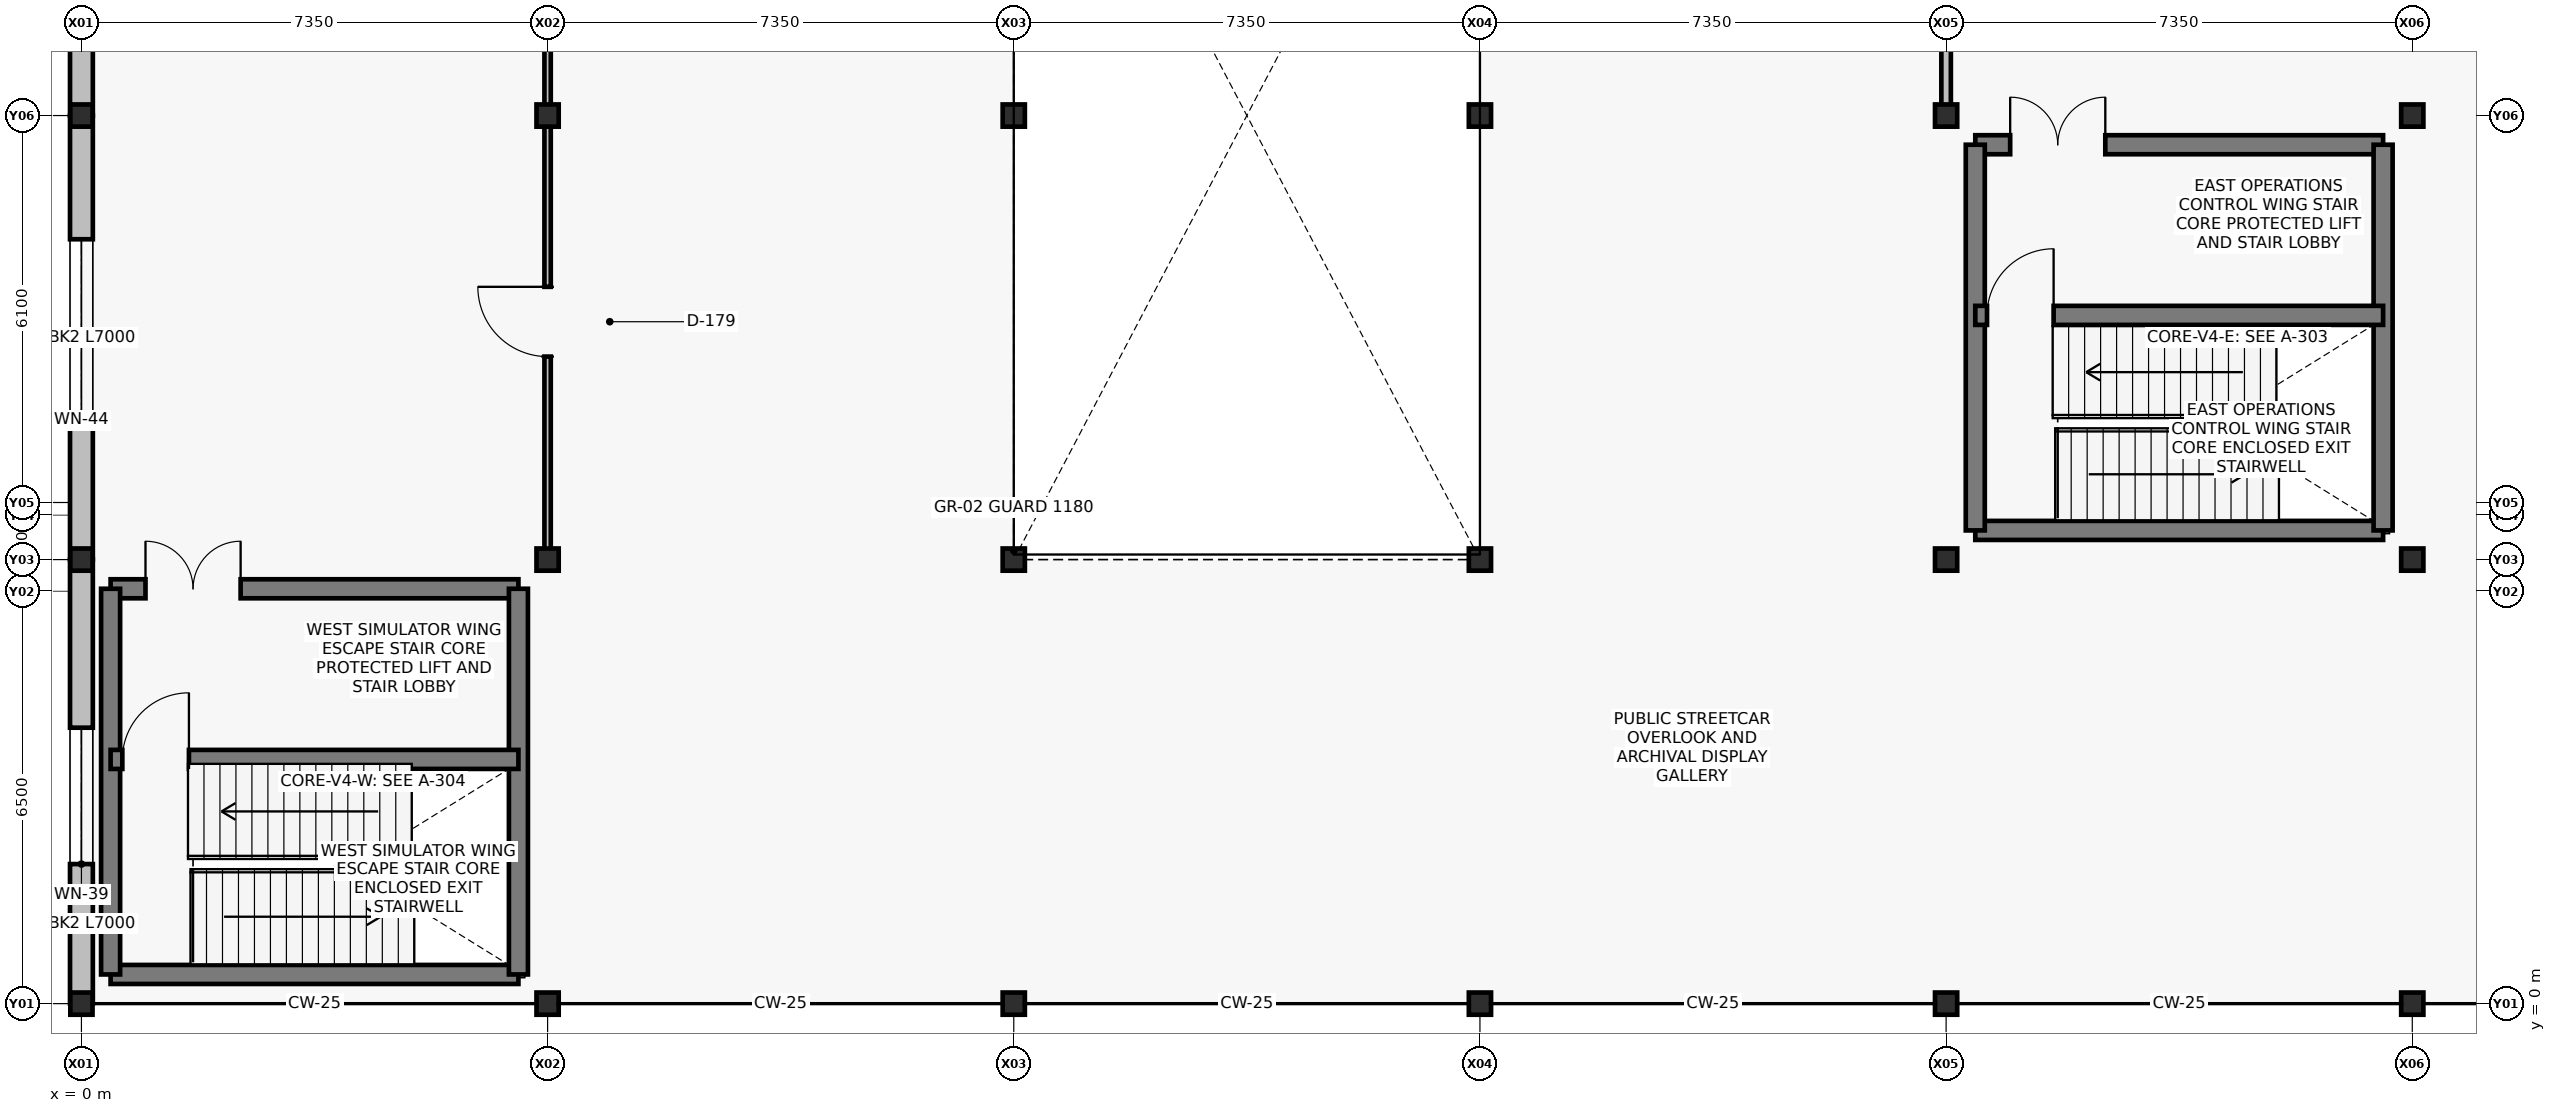
"""IFC4 building model, lengths in metres.
Left out: names, types, materials, properties, quantities, classifications, styles, units other than length and angle.
Written with IfcOpenShell. Run it as: python <this file> out.ifc"""

import sys

from ifc_helpers import new_model, si_unit, direction, frame, frame_2d, origin, origin_2d, place, context, subcontext, project, spatial, rectangle, i_section, extrude, element, fill, save


model = new_model("IFC4")
c1 = context("Model", 3, precision=1e-05, world=origin(), true_north=direction((0.0, 1.0)))
c2 = subcontext(c1, "Body", "Model", "MODEL_VIEW")
j1 = project(units=[si_unit("LENGTHUNIT", "METRE"), si_unit("PLANEANGLEUNIT", "RADIAN")], contexts=[c1])
p1 = place(None, origin())
s1 = spatial("IfcSite", under=j1, at=p1, CompositionType="ELEMENT")
p2 = place(p1, origin())
s2 = spatial("IfcBuilding", under=s1, at=p2, CompositionType="ELEMENT")
p3 = place(p2, frame((0.0, 0.0, 6.0)))
s3 = spatial("IfcBuildingStorey", under=s2, at=p3, CompositionType="ELEMENT", Elevation=6.0)
for number, where, z_axis, x_axis in (
    (1, (0.0, 0.0, 0.0), (0.0, 0.0, 1.0), (1.0, 0.0, 0.0)),
    (2, (0.0, 7.0, 0.0), (0.0, 0.0, 1.0), (1.0, 0.0, 0.0)),
    (3, (0.0, 14.0, 0.0), (0.0, 0.0, 1.0), (1.0, 0.0, 0.0)),
    (4, (7.35, 0.0, 0.0), (0.0, 0.0, 1.0), (1.0, 0.0, 0.0)),
    (5, (7.35, 7.0, 0.0), (0.0, 0.0, 1.0), (1.0, 0.0, 0.0)),
    (6, (7.35, 14.0, 0.0), (0.0, 0.0, 1.0), (1.0, 0.0, 0.0)),
    (7, (14.7, 0.0, 0.0), (0.0, 0.0, 1.0), (1.0, 0.0, 0.0)),
    (8, (14.7, 7.0, 0.0), (0.0, 0.0, 1.0), (1.0, 0.0, 0.0)),
    (9, (14.7, 14.0, 0.0), (0.0, 0.0, 1.0), (1.0, 0.0, 0.0)),
    (10, (22.05, 0.0, 0.0), (0.0, 0.0, 1.0), (1.0, 0.0, 0.0)),
    (11, (22.05, 7.0, 0.0), (0.0, 0.0, 1.0), (1.0, 0.0, 0.0)),
    (12, (22.05, 14.0, 0.0), (0.0, 0.0, 1.0), (1.0, 0.0, 0.0)),
    (13, (29.4, 0.0, 0.0), (0.0, 0.0, 1.0), (1.0, 0.0, 0.0)),
    (14, (29.4, 7.0, 0.0), (0.0, 0.0, 1.0), (1.0, 0.0, 0.0)),
    (15, (29.4, 14.0, 0.0), (0.0, 0.0, 1.0), (1.0, 0.0, 0.0)),
    (16, (36.75, 0.0, 0.0), (0.0, 0.0, 1.0), (1.0, 0.0, 0.0)),
    (17, (36.75, 7.0, 0.0), (0.0, 0.0, 1.0), (1.0, 0.0, 0.0)),
    (18, (36.75, 14.0, 0.0), (0.0, 0.0, 1.0), (1.0, 0.0, 0.0)),
):
    element("IfcColumn", number, at=place(p3, frame(where, z_axis=z_axis, x_axis=x_axis)), inside=s3, PredefinedType="COLUMN", context=c2, shape_type="SweptSolid", body=[
        extrude(i_section(OverallWidth=0.35, OverallDepth=0.35, WebThickness=0.012, FlangeThickness=0.019, at=origin_2d()), origin(), (0.0, 0.0, 1.0), 5.1),
    ])
p4 = place(p3, frame((0.0, 0.0, 0.0), z_axis=(0.0, 0.0, 1.0), x_axis=(0.0, 1.0, 0.0)))
e19 = element("IfcWall", 19, at=p4, inside=s3, PredefinedType="SOLIDWALL", context=c2, shape_type="SweptSolid", body=[
    extrude(rectangle(XDim=7.0, YDim=0.36, at=frame_2d((3.5, 0.0))), origin(), (0.0, 0.0, 1.0), 4.25),
])
p5 = place(p4, frame((2.2, 0.0, 0.95)))
e20 = element("IfcOpeningElement", 20, at=p5, cuts=e19, PredefinedType="OPENING", context=c2, shape_type="SweptSolid", body=[
    extrude(rectangle(XDim=2.15, YDim=1.9, at=frame_2d((1.075, 0.95))), frame((0.0, 0.19, 0.0), z_axis=(0.0, -1.0, 0.0), x_axis=(1.0, 0.0, 0.0)), (0.0, 0.0, 1.0), 0.38),
])
p6 = place(p3, frame((0.0, 7.0, 0.0), z_axis=(0.0, 0.0, 1.0), x_axis=(0.0, 1.0, 0.0)))
e21 = element("IfcWall", 21, at=p6, inside=s3, PredefinedType="SOLIDWALL", context=c2, shape_type="SweptSolid", body=[
    extrude(rectangle(XDim=7.0, YDim=0.36, at=frame_2d((3.5, 0.0))), origin(), (0.0, 0.0, 1.0), 4.25),
])
p7 = place(p6, frame((2.2, 0.0, 0.95)))
e22 = element("IfcOpeningElement", 22, at=p7, cuts=e21, PredefinedType="OPENING", context=c2, shape_type="SweptSolid", body=[
    extrude(rectangle(XDim=2.85, YDim=1.85, at=frame_2d((1.425, 0.925))), frame((0.0, 0.19, 0.0), z_axis=(0.0, -1.0, 0.0), x_axis=(1.0, 0.0, 0.0)), (0.0, 0.0, 1.0), 0.38),
])
p8 = place(p3, frame((0.0, 14.0, 0.0), z_axis=(0.0, 0.0, 1.0), x_axis=(0.0, 1.0, 0.0)))
e23 = element("IfcWall", 23, at=p8, inside=s3, PredefinedType="SOLIDWALL", context=c2, shape_type="SweptSolid", body=[
    extrude(rectangle(XDim=7.0, YDim=0.36, at=frame_2d((3.5, 0.0))), origin(), (0.0, 0.0, 1.0), 4.25),
])
p9 = place(p8, frame((2.2, 0.0, 0.95)))
e24 = element("IfcOpeningElement", 24, at=p9, cuts=e23, PredefinedType="OPENING", context=c2, shape_type="SweptSolid", body=[
    extrude(rectangle(XDim=3.5, YDim=2.0, at=frame_2d((1.75, 1.0))), frame((0.0, 0.19, 0.0), z_axis=(0.0, -1.0, 0.0), x_axis=(1.0, 0.0, 0.0)), (0.0, 0.0, 1.0), 0.38),
])
p10 = place(p3, frame((29.86, 7.46, 0.0), z_axis=(0.0, 0.0, 1.0), x_axis=(1.0, 0.0, 0.0)))
e25 = element("IfcWall", 25, at=p10, inside=s3, PredefinedType="SHEAR", context=c2, shape_type="SweptSolid", body=[
    extrude(rectangle(XDim=6.43, YDim=0.3, at=frame_2d((3.215, 0.0))), origin(), (0.0, 0.0, 1.0), 4.82),
])
p11 = place(p3, frame((29.86, 13.54, 0.0), z_axis=(0.0, 0.0, 1.0), x_axis=(1.0, 0.0, 0.0)))
e26 = element("IfcWall", 26, at=p11, inside=s3, PredefinedType="SHEAR", context=c2, shape_type="SweptSolid", body=[
    extrude(rectangle(XDim=6.43, YDim=0.3, at=frame_2d((3.215, 0.0))), origin(), (0.0, 0.0, 1.0), 4.82),
])
p12 = place(p11, frame((0.55, 0.0, 0.0)))
e27 = element("IfcOpeningElement", 27, at=p12, cuts=e26, PredefinedType="OPENING", context=c2, shape_type="SweptSolid", body=[
    extrude(rectangle(XDim=1.5, YDim=2.2, at=frame_2d((0.75, 1.1))), frame((0.0, 0.16, 0.0), z_axis=(0.0, -1.0, 0.0), x_axis=(1.0, 0.0, 0.0)), (0.0, 0.0, 1.0), 0.32),
])
for number, where, z_axis, x_axis in (
    (28, (29.86, 7.46, 0.0), (0.0, 0.0, 1.0), (0.0, 1.0, 0.0)),
    (29, (36.29, 7.46, 0.0), (0.0, 0.0, 1.0), (0.0, 1.0, 0.0)),
):
    element("IfcWall", number, at=place(p3, frame(where, z_axis=z_axis, x_axis=x_axis)), inside=s3, PredefinedType="SHEAR", context=c2, shape_type="SweptSolid", body=[
        extrude(rectangle(XDim=6.08, YDim=0.3, at=frame_2d((3.04, 0.0))), origin(), (0.0, 0.0, 1.0), 4.82),
    ])
p13 = place(p3, frame((29.86, 10.85, 0.0), z_axis=(0.0, 0.0, 1.0), x_axis=(1.0, 0.0, 0.0)))
e30 = element("IfcWall", 30, at=p13, inside=s3, PredefinedType="SHEAR", context=c2, shape_type="SweptSolid", body=[
    extrude(rectangle(XDim=6.43, YDim=0.3, at=frame_2d((3.215, 0.0))), origin(), (0.0, 0.0, 1.0), 4.82),
])
p14 = place(p13, frame((0.185, 0.0, 0.0)))
e31 = element("IfcOpeningElement", 31, at=p14, cuts=e30, PredefinedType="OPENING", context=c2, shape_type="SweptSolid", body=[
    extrude(rectangle(XDim=1.05, YDim=2.15, at=frame_2d((0.525, 1.075))), frame((0.0, 0.16, 0.0), z_axis=(0.0, -1.0, 0.0), x_axis=(1.0, 0.0, 0.0)), (0.0, 0.0, 1.0), 0.32),
])
p15 = place(p3, frame((0.46, 0.46, 0.0), z_axis=(0.0, 0.0, 1.0), x_axis=(1.0, 0.0, 0.0)))
e32 = element("IfcWall", 32, at=p15, inside=s3, PredefinedType="SHEAR", context=c2, shape_type="SweptSolid", body=[
    extrude(rectangle(XDim=6.43, YDim=0.3, at=frame_2d((3.215, 0.0))), origin(), (0.0, 0.0, 1.0), 4.82),
])
p16 = place(p3, frame((0.46, 6.54, 0.0), z_axis=(0.0, 0.0, 1.0), x_axis=(1.0, 0.0, 0.0)))
e33 = element("IfcWall", 33, at=p16, inside=s3, PredefinedType="SHEAR", context=c2, shape_type="SweptSolid", body=[
    extrude(rectangle(XDim=6.43, YDim=0.3, at=frame_2d((3.215, 0.0))), origin(), (0.0, 0.0, 1.0), 4.82),
])
p17 = place(p16, frame((0.55, 0.0, 0.0)))
e34 = element("IfcOpeningElement", 34, at=p17, cuts=e33, PredefinedType="OPENING", context=c2, shape_type="SweptSolid", body=[
    extrude(rectangle(XDim=1.5, YDim=2.2, at=frame_2d((0.75, 1.1))), frame((0.0, 0.16, 0.0), z_axis=(0.0, -1.0, 0.0), x_axis=(1.0, 0.0, 0.0)), (0.0, 0.0, 1.0), 0.32),
])
for number, where, z_axis, x_axis in (
    (35, (0.46, 0.46, 0.0), (0.0, 0.0, 1.0), (0.0, 1.0, 0.0)),
    (36, (6.89, 0.46, 0.0), (0.0, 0.0, 1.0), (0.0, 1.0, 0.0)),
):
    element("IfcWall", number, at=place(p3, frame(where, z_axis=z_axis, x_axis=x_axis)), inside=s3, PredefinedType="SHEAR", context=c2, shape_type="SweptSolid", body=[
        extrude(rectangle(XDim=6.08, YDim=0.3, at=frame_2d((3.04, 0.0))), origin(), (0.0, 0.0, 1.0), 4.82),
    ])
p18 = place(p3, frame((0.46, 3.85, 0.0), z_axis=(0.0, 0.0, 1.0), x_axis=(1.0, 0.0, 0.0)))
e37 = element("IfcWall", 37, at=p18, inside=s3, PredefinedType="SHEAR", context=c2, shape_type="SweptSolid", body=[
    extrude(rectangle(XDim=6.43, YDim=0.3, at=frame_2d((3.215, 0.0))), origin(), (0.0, 0.0, 1.0), 4.82),
])
p19 = place(p18, frame((0.185, 0.0, 0.0)))
e38 = element("IfcOpeningElement", 38, at=p19, cuts=e37, PredefinedType="OPENING", context=c2, shape_type="SweptSolid", body=[
    extrude(rectangle(XDim=1.05, YDim=2.15, at=frame_2d((0.525, 1.075))), frame((0.0, 0.16, 0.0), z_axis=(0.0, -1.0, 0.0), x_axis=(1.0, 0.0, 0.0)), (0.0, 0.0, 1.0), 0.32),
])
p20 = place(p3, frame((29.4, 14.0, 0.0), z_axis=(0.0, 0.0, 1.0), x_axis=(0.0, 1.0, 0.0)))
e39 = element("IfcWall", 39, at=p20, inside=s3, PredefinedType="PARTITIONING", context=c2, shape_type="SweptSolid", body=[
    extrude(rectangle(XDim=49.0, YDim=0.15, at=frame_2d((24.5, 0.0))), origin(), (0.0, 0.0, 1.0), 4.05),
])
p21 = place(p20, frame((10.0, 0.0, 0.0)))
e40 = element("IfcOpeningElement", 40, at=p21, cuts=e39, PredefinedType="OPENING", context=c2, shape_type="SweptSolid", body=[
    extrude(rectangle(XDim=1.4, YDim=2.2, at=frame_2d((0.7, 1.1))), frame((0.0, 0.085, 0.0), z_axis=(0.0, -1.0, 0.0), x_axis=(1.0, 0.0, 0.0)), (0.0, 0.0, 1.0), 0.17),
])
p22 = place(p20, frame((31.0, 0.0, 0.0)))
e41 = element("IfcOpeningElement", 41, at=p22, cuts=e39, PredefinedType="OPENING", context=c2, shape_type="SweptSolid", body=[
    extrude(rectangle(XDim=1.25, YDim=2.15, at=frame_2d((0.625, 1.075))), frame((0.0, 0.085, 0.0), z_axis=(0.0, -1.0, 0.0), x_axis=(1.0, 0.0, 0.0)), (0.0, 0.0, 1.0), 0.17),
])
p23 = place(p3, frame((7.35, 7.0, 0.0), z_axis=(0.0, 0.0, 1.0), x_axis=(0.0, 1.0, 0.0)))
e42 = element("IfcWall", 42, at=p23, inside=s3, PredefinedType="PARTITIONING", context=c2, shape_type="SweptSolid", body=[
    extrude(rectangle(XDim=21.0, YDim=0.1, at=frame_2d((10.5, 0.0))), origin(), (0.0, 0.0, 1.0), 4.05),
])
p24 = place(p23, frame((3.2, 0.0, 0.0)))
e43 = element("IfcOpeningElement", 43, at=p24, cuts=e42, PredefinedType="OPENING", context=c2, shape_type="SweptSolid", body=[
    extrude(rectangle(XDim=1.1, YDim=2.1, at=frame_2d((0.55, 1.05))), frame((0.0, 0.06, 0.0), z_axis=(0.0, -1.0, 0.0), x_axis=(1.0, 0.0, 0.0)), (0.0, 0.0, 1.0), 0.12),
])
p25 = place(p5, origin())
e44 = element("IfcWindow", 44, at=p25, inside=s3, PartitioningType="SINGLE_PANEL", PredefinedType="WINDOW", context=c2, shape_type="SweptSolid", body=[
    extrude(rectangle(XDim=2.15, YDim=1.9, at=frame_2d((1.075, 0.95))), frame((0.0, 0.03, 0.0), z_axis=(0.0, -1.0, 0.0), x_axis=(1.0, 0.0, 0.0)), (0.0, 0.0, 1.0), 0.06),
])
fill(e20, e44)
p26 = place(p7, origin())
e45 = element("IfcWindow", 45, at=p26, inside=s3, PartitioningType="SINGLE_PANEL", PredefinedType="WINDOW", context=c2, shape_type="SweptSolid", body=[
    extrude(rectangle(XDim=2.85, YDim=1.85, at=frame_2d((1.425, 0.925))), frame((0.0, 0.03, 0.0), z_axis=(0.0, -1.0, 0.0), x_axis=(1.0, 0.0, 0.0)), (0.0, 0.0, 1.0), 0.06),
])
fill(e22, e45)
p27 = place(p14, origin())
e46 = element("IfcDoor", 46, at=p27, inside=s3, OperationType="SINGLE_SWING_RIGHT", PredefinedType="DOOR", context=c2, shape_type="SweptSolid", body=[
    extrude(rectangle(XDim=1.05, YDim=2.15, at=frame_2d((0.525, 1.075))), frame((0.0, 0.025, 0.0), z_axis=(0.0, -1.0, 0.0), x_axis=(1.0, 0.0, 0.0)), (0.0, 0.0, 1.0), 0.05),
])
fill(e31, e46)
p28 = place(p12, origin())
e47 = element("IfcDoor", 47, at=p28, inside=s3, OperationType="DOUBLE_DOOR_SINGLE_SWING", PredefinedType="DOOR", context=c2, shape_type="SweptSolid", body=[
    extrude(rectangle(XDim=1.5, YDim=2.2, at=frame_2d((0.75, 1.1))), frame((0.0, 0.025, 0.0), z_axis=(0.0, -1.0, 0.0), x_axis=(1.0, 0.0, 0.0)), (0.0, 0.0, 1.0), 0.05),
])
fill(e27, e47)
p29 = place(p19, origin())
e48 = element("IfcDoor", 48, at=p29, inside=s3, OperationType="SINGLE_SWING_RIGHT", PredefinedType="DOOR", context=c2, shape_type="SweptSolid", body=[
    extrude(rectangle(XDim=1.05, YDim=2.15, at=frame_2d((0.525, 1.075))), frame((0.0, 0.025, 0.0), z_axis=(0.0, -1.0, 0.0), x_axis=(1.0, 0.0, 0.0)), (0.0, 0.0, 1.0), 0.05),
])
fill(e38, e48)
p30 = place(p17, origin())
e49 = element("IfcDoor", 49, at=p30, inside=s3, OperationType="DOUBLE_DOOR_SINGLE_SWING", PredefinedType="DOOR", context=c2, shape_type="SweptSolid", body=[
    extrude(rectangle(XDim=1.5, YDim=2.2, at=frame_2d((0.75, 1.1))), frame((0.0, 0.025, 0.0), z_axis=(0.0, -1.0, 0.0), x_axis=(1.0, 0.0, 0.0)), (0.0, 0.0, 1.0), 0.05),
])
fill(e34, e49)
p31 = place(p24, origin())
e50 = element("IfcDoor", 50, at=p31, inside=s3, OperationType="SINGLE_SWING_RIGHT", PredefinedType="DOOR", context=c2, shape_type="SweptSolid", body=[
    extrude(rectangle(XDim=1.1, YDim=2.1, at=frame_2d((0.55, 1.05))), frame((0.0, 0.025, 0.0), z_axis=(0.0, -1.0, 0.0), x_axis=(1.0, 0.0, 0.0)), (0.0, 0.0, 1.0), 0.05),
])
fill(e43, e50)
save(model, sys.argv[1])
